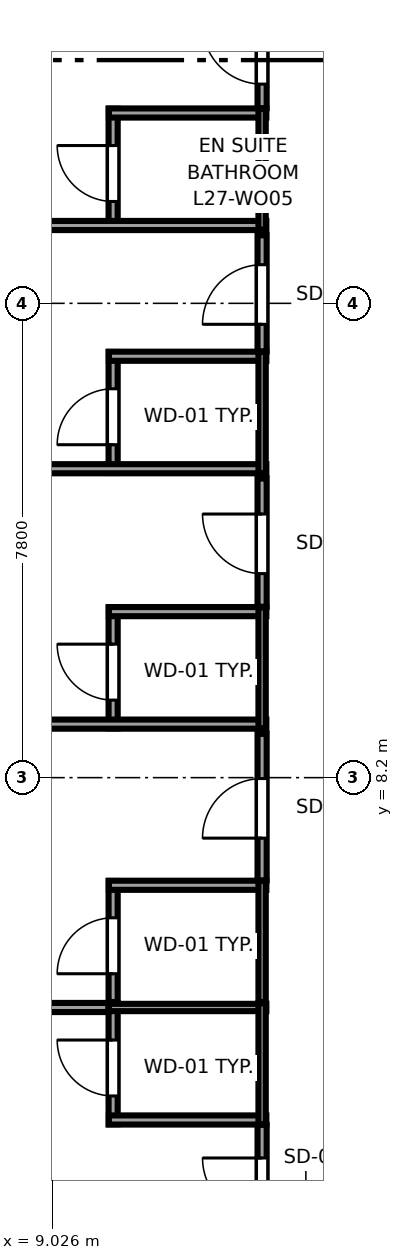
"""IFC4 building model, lengths in metres.
Left out: names, types, materials, properties, quantities, classifications, styles, units other than length and angle.
Written with IfcOpenShell. Run it as: python <this file> out.ifc"""

import sys

from ifc_helpers import new_model, si_unit, direction, frame, frame_2d, origin, place, context, subcontext, project, spatial, rectangle, extrude, source, transform, mapped, element, fill, save


model = new_model("IFC4")
c1 = context("Model", 3, precision=1e-05, world=origin(), true_north=direction((0.0, 1.0)))
c2 = subcontext(c1, "Body", "Model", "MODEL_VIEW")
j1 = project(units=[si_unit("LENGTHUNIT", "METRE"), si_unit("PLANEANGLEUNIT", "RADIAN")], contexts=[c1])
p1 = place(None, origin())
s1 = spatial("IfcSite", under=j1, at=p1, CompositionType="ELEMENT")
p2 = place(p1, origin())
s2 = spatial("IfcBuilding", under=s1, at=p2, CompositionType="ELEMENT")
p3 = place(p2, frame((0.0, 0.0, 108.0)))
s3 = spatial("IfcBuildingStorey", under=s2, at=p3, CompositionType="ELEMENT", Elevation=108.0)
p4 = place(p3, frame((10.03, 2.5, 0.0), z_axis=(0.0, 0.0, 1.0), x_axis=(0.0, 1.0, 0.0)))
e1 = element("IfcWall", 1, at=p4, inside=s3, PredefinedType="PARTITIONING", context=c2, shape_type="SweptSolid", body=[
    extrude(rectangle(XDim=1.99, YDim=0.15, at=frame_2d((0.995, 0.0))), origin(), (0.0, 0.0, 1.0), 3.37),
])
p5 = place(p4, frame((0.465, 0.0, 0.0)))
e2 = element("IfcOpeningElement", 2, at=p5, cuts=e1, PredefinedType="OPENING", context=c2, shape_type="SweptSolid", body=[
    extrude(rectangle(XDim=0.92, YDim=2.01, at=frame_2d((0.46, 1.005))), frame((0.0, 0.085, 0.0), z_axis=(0.0, -1.0, 0.0), x_axis=(1.0, 0.0, 0.0)), (0.0, 0.0, 1.0), 0.17),
])
p6 = place(p3, frame((9.96, 2.57, 0.0), z_axis=(0.0, 0.0, 1.0), x_axis=(1.0, 0.0, 0.0)))
e3 = element("IfcWall", 3, at=p6, inside=s3, PredefinedType="PARTITIONING", context=c2, shape_type="SweptSolid", body=[
    extrude(rectangle(XDim=2.59, YDim=0.15, at=frame_2d((1.295, 0.0))), origin(), (0.0, 0.0, 1.0), 3.37),
])
p7 = place(p3, frame((9.96, 4.42, 0.0), z_axis=(0.0, 0.0, 1.0), x_axis=(1.0, 0.0, 0.0)))
e4 = element("IfcWall", 4, at=p7, inside=s3, PredefinedType="PLUMBINGWALL", context=c2, shape_type="SweptSolid", body=[
    extrude(rectangle(XDim=2.59, YDim=0.12, at=frame_2d((1.295, 0.0))), origin(), (0.0, 0.0, 1.0), 3.37),
])
p8 = place(p3, frame((12.48, 2.5, 0.0), z_axis=(0.0, 0.0, 1.0), x_axis=(0.0, 1.0, 0.0)))
e5 = element("IfcWall", 5, at=p8, inside=s3, PredefinedType="PLUMBINGWALL", context=c2, shape_type="SweptSolid", body=[
    extrude(rectangle(XDim=1.99, YDim=0.12, at=frame_2d((0.995, 0.0))), origin(), (0.0, 0.0, 1.0), 3.37),
])
p9 = place(p3, frame((10.03, 4.51, 0.0), z_axis=(0.0, 0.0, 1.0), x_axis=(0.0, 1.0, 0.0)))
e6 = element("IfcWall", 6, at=p9, inside=s3, PredefinedType="PARTITIONING", context=c2, shape_type="SweptSolid", body=[
    extrude(rectangle(XDim=1.99, YDim=0.15, at=frame_2d((0.995, 0.0))), origin(), (0.0, 0.0, 1.0), 3.37),
])
p10 = place(p9, frame((0.465, 0.0, 0.0)))
e7 = element("IfcOpeningElement", 7, at=p10, cuts=e6, PredefinedType="OPENING", context=c2, shape_type="SweptSolid", body=[
    extrude(rectangle(XDim=0.92, YDim=2.01, at=frame_2d((0.46, 1.005))), frame((0.0, 0.085, 0.0), z_axis=(0.0, -1.0, 0.0), x_axis=(1.0, 0.0, 0.0)), (0.0, 0.0, 1.0), 0.17),
])
p11 = place(p3, frame((9.96, 6.43, 0.0), z_axis=(0.0, 0.0, 1.0), x_axis=(1.0, 0.0, 0.0)))
e8 = element("IfcWall", 8, at=p11, inside=s3, PredefinedType="PARTITIONING", context=c2, shape_type="SweptSolid", body=[
    extrude(rectangle(XDim=2.59, YDim=0.15, at=frame_2d((1.295, 0.0))), origin(), (0.0, 0.0, 1.0), 3.37),
])
p12 = place(p3, frame((12.48, 4.51, 0.0), z_axis=(0.0, 0.0, 1.0), x_axis=(0.0, 1.0, 0.0)))
e9 = element("IfcWall", 9, at=p12, inside=s3, PredefinedType="PLUMBINGWALL", context=c2, shape_type="SweptSolid", body=[
    extrude(rectangle(XDim=1.99, YDim=0.12, at=frame_2d((0.995, 0.0))), origin(), (0.0, 0.0, 1.0), 3.37),
])
p13 = place(p3, frame((10.03, 9.01, 0.0), z_axis=(0.0, 0.0, 1.0), x_axis=(0.0, 1.0, 0.0)))
e10 = element("IfcWall", 10, at=p13, inside=s3, PredefinedType="PARTITIONING", context=c2, shape_type="SweptSolid", body=[
    extrude(rectangle(XDim=1.99, YDim=0.15, at=frame_2d((0.995, 0.0))), origin(), (0.0, 0.0, 1.0), 3.37),
])
p14 = place(p13, frame((0.465, 0.0, 0.0)))
e11 = element("IfcOpeningElement", 11, at=p14, cuts=e10, PredefinedType="OPENING", context=c2, shape_type="SweptSolid", body=[
    extrude(rectangle(XDim=0.92, YDim=2.01, at=frame_2d((0.46, 1.005))), frame((0.0, 0.085, 0.0), z_axis=(0.0, -1.0, 0.0), x_axis=(1.0, 0.0, 0.0)), (0.0, 0.0, 1.0), 0.17),
])
p15 = place(p3, frame((0.405, 9.08, 0.0), z_axis=(0.0, 0.0, 1.0), x_axis=(1.0, 0.0, 0.0)))
e12 = element("IfcWall", 12, at=p15, inside=s3, PredefinedType="PARTITIONING", context=c2, shape_type="SweptSolid", body=[
    extrude(rectangle(XDim=12.145, YDim=0.15, at=frame_2d((6.073, 0.0))), origin(), (0.0, 0.0, 1.0), 3.37),
])
p16 = place(p3, frame((9.96, 10.93, 0.0), z_axis=(0.0, 0.0, 1.0), x_axis=(1.0, 0.0, 0.0)))
e13 = element("IfcWall", 13, at=p16, inside=s3, PredefinedType="PARTITIONING", context=c2, shape_type="SweptSolid", body=[
    extrude(rectangle(XDim=2.59, YDim=0.15, at=frame_2d((1.295, 0.0))), origin(), (0.0, 0.0, 1.0), 3.37),
])
p17 = place(p3, frame((12.48, 9.01, 0.0), z_axis=(0.0, 0.0, 1.0), x_axis=(0.0, 1.0, 0.0)))
e14 = element("IfcWall", 14, at=p17, inside=s3, PredefinedType="PLUMBINGWALL", context=c2, shape_type="SweptSolid", body=[
    extrude(rectangle(XDim=1.99, YDim=0.12, at=frame_2d((0.995, 0.0))), origin(), (0.0, 0.0, 1.0), 3.37),
])
p18 = place(p3, frame((10.03, 13.21, 0.0), z_axis=(0.0, 0.0, 1.0), x_axis=(0.0, 1.0, 0.0)))
e15 = element("IfcWall", 15, at=p18, inside=s3, PredefinedType="PARTITIONING", context=c2, shape_type="SweptSolid", body=[
    extrude(rectangle(XDim=1.99, YDim=0.15, at=frame_2d((0.995, 0.0))), origin(), (0.0, 0.0, 1.0), 3.37),
])
p19 = place(p18, frame((0.465, 0.0, 0.0)))
e16 = element("IfcOpeningElement", 16, at=p19, cuts=e15, PredefinedType="OPENING", context=c2, shape_type="SweptSolid", body=[
    extrude(rectangle(XDim=0.92, YDim=2.01, at=frame_2d((0.46, 1.005))), frame((0.0, 0.085, 0.0), z_axis=(0.0, -1.0, 0.0), x_axis=(1.0, 0.0, 0.0)), (0.0, 0.0, 1.0), 0.17),
])
p20 = place(p3, frame((0.405, 13.28, 0.0), z_axis=(0.0, 0.0, 1.0), x_axis=(1.0, 0.0, 0.0)))
e17 = element("IfcWall", 17, at=p20, inside=s3, PredefinedType="PARTITIONING", context=c2, shape_type="SweptSolid", body=[
    extrude(rectangle(XDim=12.145, YDim=0.15, at=frame_2d((6.073, 0.0))), origin(), (0.0, 0.0, 1.0), 3.37),
])
p21 = place(p3, frame((9.96, 15.13, 0.0), z_axis=(0.0, 0.0, 1.0), x_axis=(1.0, 0.0, 0.0)))
e18 = element("IfcWall", 18, at=p21, inside=s3, PredefinedType="PARTITIONING", context=c2, shape_type="SweptSolid", body=[
    extrude(rectangle(XDim=2.59, YDim=0.15, at=frame_2d((1.295, 0.0))), origin(), (0.0, 0.0, 1.0), 3.37),
])
p22 = place(p3, frame((12.48, 13.21, 0.0), z_axis=(0.0, 0.0, 1.0), x_axis=(0.0, 1.0, 0.0)))
e19 = element("IfcWall", 19, at=p22, inside=s3, PredefinedType="PLUMBINGWALL", context=c2, shape_type="SweptSolid", body=[
    extrude(rectangle(XDim=1.99, YDim=0.12, at=frame_2d((0.995, 0.0))), origin(), (0.0, 0.0, 1.0), 3.37),
])
p23 = place(p3, frame((10.03, 17.21, 0.0), z_axis=(0.0, 0.0, 1.0), x_axis=(0.0, 1.0, 0.0)))
e20 = element("IfcWall", 20, at=p23, inside=s3, PredefinedType="PARTITIONING", context=c2, shape_type="SweptSolid", body=[
    extrude(rectangle(XDim=1.99, YDim=0.15, at=frame_2d((0.995, 0.0))), origin(), (0.0, 0.0, 1.0), 3.37),
])
p24 = place(p23, frame((0.465, 0.0, 0.0)))
e21 = element("IfcOpeningElement", 21, at=p24, cuts=e20, PredefinedType="OPENING", context=c2, shape_type="SweptSolid", body=[
    extrude(rectangle(XDim=0.92, YDim=2.01, at=frame_2d((0.46, 1.005))), frame((0.0, 0.085, 0.0), z_axis=(0.0, -1.0, 0.0), x_axis=(1.0, 0.0, 0.0)), (0.0, 0.0, 1.0), 0.17),
])
p25 = place(p3, frame((0.405, 17.28, 0.0), z_axis=(0.0, 0.0, 1.0), x_axis=(1.0, 0.0, 0.0)))
e22 = element("IfcWall", 22, at=p25, inside=s3, PredefinedType="PARTITIONING", context=c2, shape_type="SweptSolid", body=[
    extrude(rectangle(XDim=12.145, YDim=0.15, at=frame_2d((6.073, 0.0))), origin(), (0.0, 0.0, 1.0), 3.37),
])
p26 = place(p3, frame((9.96, 19.13, 0.0), z_axis=(0.0, 0.0, 1.0), x_axis=(1.0, 0.0, 0.0)))
e23 = element("IfcWall", 23, at=p26, inside=s3, PredefinedType="PARTITIONING", context=c2, shape_type="SweptSolid", body=[
    extrude(rectangle(XDim=2.59, YDim=0.15, at=frame_2d((1.295, 0.0))), origin(), (0.0, 0.0, 1.0), 3.37),
])
p27 = place(p3, frame((12.48, 17.21, 0.0), z_axis=(0.0, 0.0, 1.0), x_axis=(0.0, 1.0, 0.0)))
e24 = element("IfcWall", 24, at=p27, inside=s3, PredefinedType="PLUMBINGWALL", context=c2, shape_type="SweptSolid", body=[
    extrude(rectangle(XDim=1.99, YDim=0.12, at=frame_2d((0.995, 0.0))), origin(), (0.0, 0.0, 1.0), 3.37),
])
p28 = place(p3, frame((12.48, 0.405, 0.0), z_axis=(0.0, 0.0, 1.0), x_axis=(0.0, 1.0, 0.0)))
e25 = element("IfcWall", 25, at=p28, inside=s3, PredefinedType="PARTITIONING", context=c2, shape_type="SweptSolid", body=[
    extrude(rectangle(XDim=2.085, YDim=0.15, at=frame_2d((1.042, 0.0))), origin(), (0.0, 0.0, 1.0), 3.37),
])
p29 = place(p28, frame((0.56, 0.0, 0.0)))
e26 = element("IfcOpeningElement", 26, at=p29, cuts=e25, PredefinedType="OPENING", context=c2, shape_type="SweptSolid", body=[
    extrude(rectangle(XDim=0.98, YDim=2.12, at=frame_2d((0.49, 1.06))), frame((0.0, 0.085, 0.0), z_axis=(0.0, -1.0, 0.0), x_axis=(1.0, 0.0, 0.0)), (0.0, 0.0, 1.0), 0.17),
])
p30 = place(p3, frame((0.417, 4.42, 0.0), z_axis=(0.0, 0.0, 1.0), x_axis=(1.0, 0.0, 0.0)))
e27 = element("IfcWall", 27, at=p30, inside=s3, PredefinedType="PARTITIONING", context=c2, shape_type="SweptSolid", body=[
    extrude(rectangle(XDim=9.533, YDim=0.15, at=frame_2d((4.767, 0.0))), origin(), (0.0, 0.0, 1.0), 3.37),
])
p31 = place(p3, frame((12.48, 6.51, 0.0), z_axis=(0.0, 0.0, 1.0), x_axis=(0.0, 1.0, 0.0)))
e28 = element("IfcWall", 28, at=p31, inside=s3, PredefinedType="PARTITIONING", context=c2, shape_type="SweptSolid", body=[
    extrude(rectangle(XDim=2.41, YDim=0.15, at=frame_2d((1.205, 0.0))), origin(), (0.0, 0.0, 1.0), 3.37),
])
p32 = place(p31, frame((0.695, 0.0, 0.0)))
e29 = element("IfcOpeningElement", 29, at=p32, cuts=e28, PredefinedType="OPENING", context=c2, shape_type="SweptSolid", body=[
    extrude(rectangle(XDim=0.98, YDim=2.12, at=frame_2d((0.49, 1.06))), frame((0.0, 0.085, 0.0), z_axis=(0.0, -1.0, 0.0), x_axis=(1.0, 0.0, 0.0)), (0.0, 0.0, 1.0), 0.17),
])
p33 = place(p3, frame((12.48, 11.01, 0.0), z_axis=(0.0, 0.0, 1.0), x_axis=(0.0, 1.0, 0.0)))
e30 = element("IfcWall", 30, at=p33, inside=s3, PredefinedType="PARTITIONING", context=c2, shape_type="SweptSolid", body=[
    extrude(rectangle(XDim=2.11, YDim=0.15, at=frame_2d((1.055, 0.0))), origin(), (0.0, 0.0, 1.0), 3.37),
])
p34 = place(p33, frame((0.545, 0.0, 0.0)))
e31 = element("IfcOpeningElement", 31, at=p34, cuts=e30, PredefinedType="OPENING", context=c2, shape_type="SweptSolid", body=[
    extrude(rectangle(XDim=0.98, YDim=2.12, at=frame_2d((0.49, 1.06))), frame((0.0, 0.085, 0.0), z_axis=(0.0, -1.0, 0.0), x_axis=(1.0, 0.0, 0.0)), (0.0, 0.0, 1.0), 0.17),
])
p35 = place(p3, frame((12.48, 15.21, 0.0), z_axis=(0.0, 0.0, 1.0), x_axis=(0.0, 1.0, 0.0)))
e32 = element("IfcWall", 32, at=p35, inside=s3, PredefinedType="PARTITIONING", context=c2, shape_type="SweptSolid", body=[
    extrude(rectangle(XDim=1.91, YDim=0.15, at=frame_2d((0.955, 0.0))), origin(), (0.0, 0.0, 1.0), 3.37),
])
p36 = place(p35, frame((0.445, 0.0, 0.0)))
e33 = element("IfcOpeningElement", 33, at=p36, cuts=e32, PredefinedType="OPENING", context=c2, shape_type="SweptSolid", body=[
    extrude(rectangle(XDim=0.98, YDim=2.12, at=frame_2d((0.49, 1.06))), frame((0.0, 0.085, 0.0), z_axis=(0.0, -1.0, 0.0), x_axis=(1.0, 0.0, 0.0)), (0.0, 0.0, 1.0), 0.17),
])
p37 = place(p3, frame((12.48, 19.21, 0.0), z_axis=(0.0, 0.0, 1.0), x_axis=(0.0, 1.0, 0.0)))
e34 = element("IfcWall", 34, at=p37, inside=s3, PredefinedType="PARTITIONING", context=c2, shape_type="SweptSolid", body=[
    extrude(rectangle(XDim=1.81, YDim=0.15, at=frame_2d((0.905, 0.0))), origin(), (0.0, 0.0, 1.0), 3.37),
])
p38 = place(p37, frame((0.395, 0.0, 0.0)))
e35 = element("IfcOpeningElement", 35, at=p38, cuts=e34, PredefinedType="OPENING", context=c2, shape_type="SweptSolid", body=[
    extrude(rectangle(XDim=0.98, YDim=2.12, at=frame_2d((0.49, 1.06))), frame((0.0, 0.085, 0.0), z_axis=(0.0, -1.0, 0.0), x_axis=(1.0, 0.0, 0.0)), (0.0, 0.0, 1.0), 0.17),
])
m1 = source(origin(), c2, "Body", "SweptSolid", [
    extrude(rectangle(XDim=0.92, YDim=2.01, at=frame_2d((0.46, 1.005))), frame((0.0, 0.025, 0.0), z_axis=(0.0, -1.0, 0.0), x_axis=(1.0, 0.0, 0.0)), (0.0, 0.0, 1.0), 0.05),
])
p39 = place(p5, origin())
e36 = element("IfcDoor", 36, at=p39, inside=s3, OperationType="SINGLE_SWING_RIGHT", PredefinedType="DOOR", context=c2, shape_type="MappedRepresentation", body=[
    mapped(m1, transform((0.0, 0.0, 0.0), x_axis=(1.0, 0.0, 0.0), y_axis=(0.0, 1.0, 0.0), z_axis=(0.0, 0.0, 1.0), scale=1.0)),
])
fill(e2, e36)
p40 = place(p10, origin())
e37 = element("IfcDoor", 37, at=p40, inside=s3, OperationType="SINGLE_SWING_LEFT", PredefinedType="DOOR", context=c2, shape_type="MappedRepresentation", body=[
    mapped(m1, transform((0.0, 0.0, 0.0), x_axis=(1.0, 0.0, 0.0), y_axis=(0.0, 1.0, 0.0), z_axis=(0.0, 0.0, 1.0), scale=1.0)),
])
fill(e7, e37)
p41 = place(p14, origin())
e38 = element("IfcDoor", 38, at=p41, inside=s3, OperationType="SINGLE_SWING_RIGHT", PredefinedType="DOOR", context=c2, shape_type="MappedRepresentation", body=[
    mapped(m1, transform((0.0, 0.0, 0.0), x_axis=(1.0, 0.0, 0.0), y_axis=(0.0, 1.0, 0.0), z_axis=(0.0, 0.0, 1.0), scale=1.0)),
])
fill(e11, e38)
p42 = place(p19, origin())
e39 = element("IfcDoor", 39, at=p42, inside=s3, OperationType="SINGLE_SWING_LEFT", PredefinedType="DOOR", context=c2, shape_type="MappedRepresentation", body=[
    mapped(m1, transform((0.0, 0.0, 0.0), x_axis=(1.0, 0.0, 0.0), y_axis=(0.0, 1.0, 0.0), z_axis=(0.0, 0.0, 1.0), scale=1.0)),
])
fill(e16, e39)
p43 = place(p24, origin())
e40 = element("IfcDoor", 40, at=p43, inside=s3, OperationType="SINGLE_SWING_RIGHT", PredefinedType="DOOR", context=c2, shape_type="MappedRepresentation", body=[
    mapped(m1, transform((0.0, 0.0, 0.0), x_axis=(1.0, 0.0, 0.0), y_axis=(0.0, 1.0, 0.0), z_axis=(0.0, 0.0, 1.0), scale=1.0)),
])
fill(e21, e40)
m2 = source(origin(), c2, "Body", "SweptSolid", [
    extrude(rectangle(XDim=0.98, YDim=2.12, at=frame_2d((0.49, 1.06))), frame((0.0, 0.025, 0.0), z_axis=(0.0, -1.0, 0.0), x_axis=(1.0, 0.0, 0.0)), (0.0, 0.0, 1.0), 0.05),
])
p44 = place(p29, origin())
e41 = element("IfcDoor", 41, at=p44, inside=s3, OperationType="SINGLE_SWING_RIGHT", PredefinedType="DOOR", context=c2, shape_type="MappedRepresentation", body=[
    mapped(m2, transform((0.0, 0.0, 0.0), x_axis=(1.0, 0.0, 0.0), y_axis=(0.0, 1.0, 0.0), z_axis=(0.0, 0.0, 1.0), scale=1.0)),
])
fill(e26, e41)
p45 = place(p32, origin())
e42 = element("IfcDoor", 42, at=p45, inside=s3, OperationType="SINGLE_SWING_LEFT", PredefinedType="DOOR", context=c2, shape_type="MappedRepresentation", body=[
    mapped(m2, transform((0.0, 0.0, 0.0), x_axis=(1.0, 0.0, 0.0), y_axis=(0.0, 1.0, 0.0), z_axis=(0.0, 0.0, 1.0), scale=1.0)),
])
fill(e29, e42)
p46 = place(p34, origin())
e43 = element("IfcDoor", 43, at=p46, inside=s3, OperationType="SINGLE_SWING_RIGHT", PredefinedType="DOOR", context=c2, shape_type="MappedRepresentation", body=[
    mapped(m2, transform((0.0, 0.0, 0.0), x_axis=(1.0, 0.0, 0.0), y_axis=(0.0, 1.0, 0.0), z_axis=(0.0, 0.0, 1.0), scale=1.0)),
])
fill(e31, e43)
p47 = place(p36, origin())
e44 = element("IfcDoor", 44, at=p47, inside=s3, OperationType="SINGLE_SWING_LEFT", PredefinedType="DOOR", context=c2, shape_type="MappedRepresentation", body=[
    mapped(m2, transform((0.0, 0.0, 0.0), x_axis=(1.0, 0.0, 0.0), y_axis=(0.0, 1.0, 0.0), z_axis=(0.0, 0.0, 1.0), scale=1.0)),
])
fill(e33, e44)
p48 = place(p38, origin())
e45 = element("IfcDoor", 45, at=p48, inside=s3, OperationType="SINGLE_SWING_RIGHT", PredefinedType="DOOR", context=c2, shape_type="MappedRepresentation", body=[
    mapped(m2, transform((0.0, 0.0, 0.0), x_axis=(1.0, 0.0, 0.0), y_axis=(0.0, 1.0, 0.0), z_axis=(0.0, 0.0, 1.0), scale=1.0)),
])
fill(e35, e45)
save(model, sys.argv[1])
